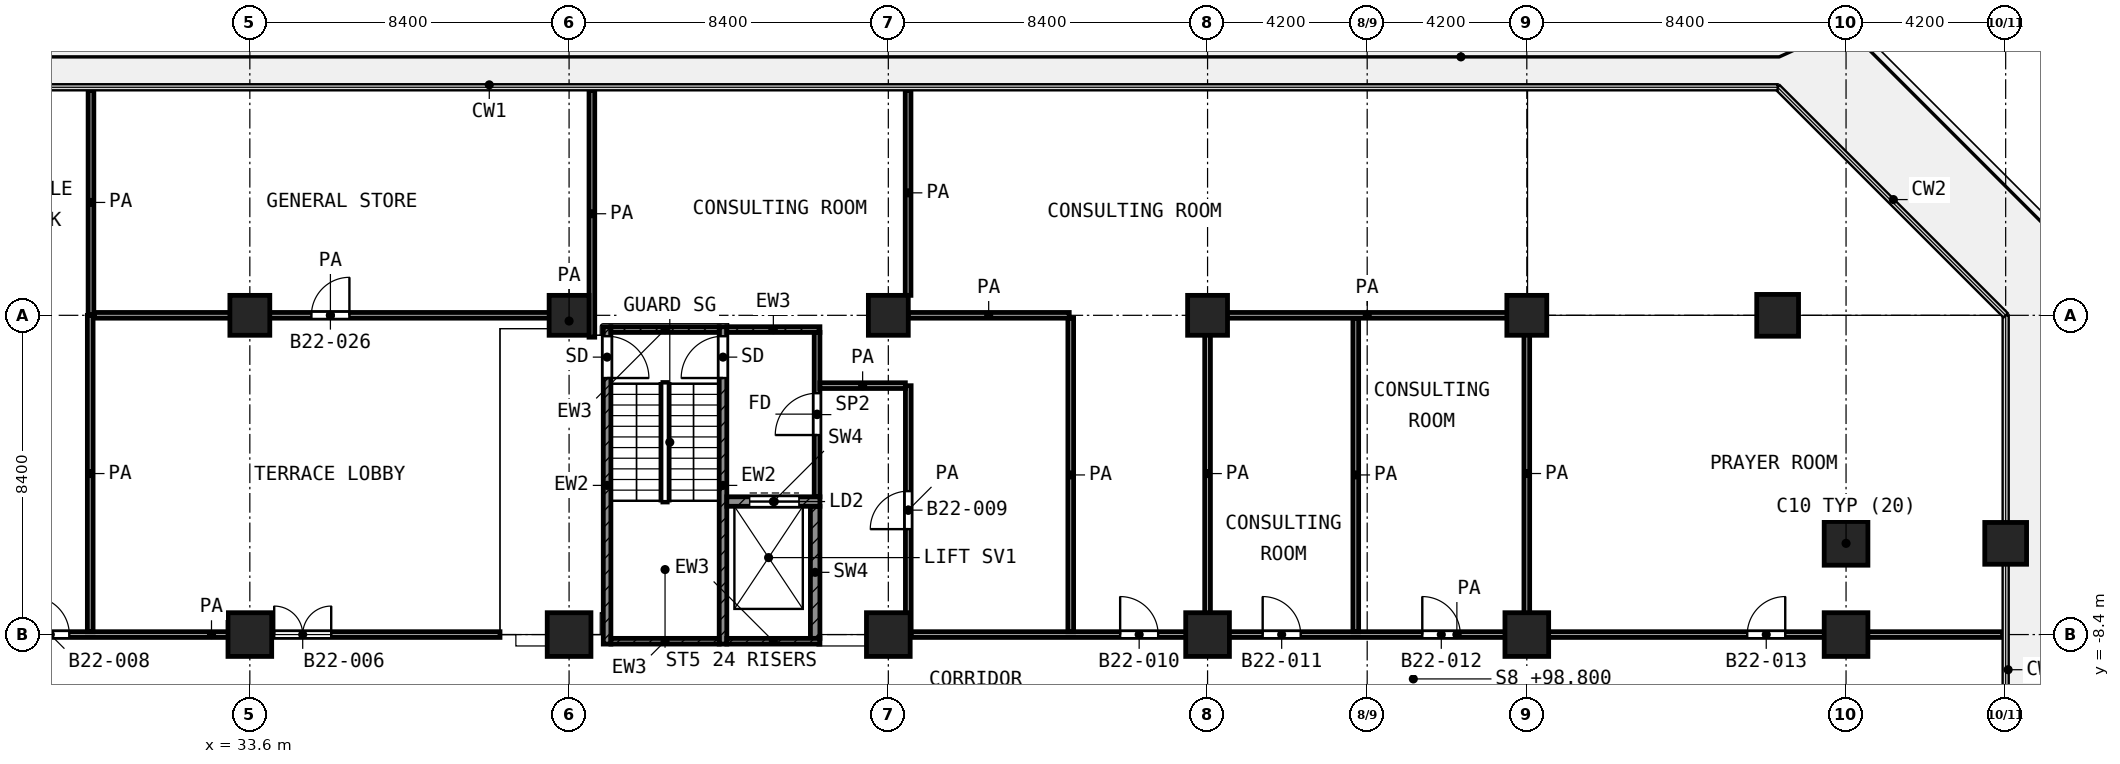
"""IFC4 building model, lengths in metres.
Left out: names, types, materials, properties, quantities, classifications, styles, units other than length and angle.
Written with IfcOpenShell. Run it as: python <this file> out.ifc"""

import sys

from ifc_helpers import new_model, si_unit, direction, frame, frame_2d, origin, origin_2d, place, context, subcontext, project, spatial, rectangle, extrude, element, fill, save


model = new_model("IFC4")
c1 = context("Model", 3, precision=1e-05, world=origin(), true_north=direction((0.0, 1.0)))
c2 = subcontext(c1, "Body", "Model", "MODEL_VIEW")
j1 = project(units=[si_unit("LENGTHUNIT", "METRE"), si_unit("PLANEANGLEUNIT", "RADIAN")], contexts=[c1])
p1 = place(None, origin())
s1 = spatial("IfcSite", under=j1, at=p1, CompositionType="ELEMENT")
p2 = place(p1, origin())
s2 = spatial("IfcBuilding", under=s1, at=p2, CompositionType="ELEMENT")
p3 = place(p2, frame((0.0, 0.0, 98.8)))
s3 = spatial("IfcBuildingStorey", under=s2, at=p3, CompositionType="ELEMENT", Elevation=98.8)
for number, where, z_axis, x_axis in (
    (1, (33.6, 0.0, 0.0), (0.0, 0.0, 1.0), (1.0, 0.0, 0.0)),
    (2, (42.0, 0.0, 0.0), (0.0, 0.0, 1.0), (1.0, 0.0, 0.0)),
    (3, (50.4, 0.0, 0.0), (0.0, 0.0, 1.0), (1.0, 0.0, 0.0)),
    (4, (58.8, 0.0, 0.0), (0.0, 0.0, 1.0), (1.0, 0.0, 0.0)),
    (5, (67.2, 0.0, 0.0), (0.0, 0.0, 1.0), (1.0, 0.0, 0.0)),
):
    element("IfcColumn", number, at=place(p3, frame(where, z_axis=z_axis, x_axis=x_axis)), inside=s3, PredefinedType="COLUMN", context=c2, shape_type="SweptSolid", body=[
        extrude(rectangle(XDim=1.05, YDim=1.05, at=origin_2d()), origin(), (0.0, 0.0, 1.0), 4.2),
    ])
p4 = place(p3, frame((73.8, 0.0, 0.0), z_axis=(0.0, 0.0, 1.0), x_axis=(1.0, 0.0, 0.0)))
e6 = element("IfcColumn", 6, at=p4, inside=s3, PredefinedType="COLUMN", context=c2, shape_type="SweptSolid", body=[
    extrude(rectangle(XDim=1.1, YDim=1.1, at=origin_2d()), origin(), (0.0, 0.0, 1.0), 4.2),
])
p5 = place(p3, frame((75.6, -6.0, 0.0), z_axis=(0.0, 0.0, 1.0), x_axis=(1.0, 0.0, 0.0)))
e7 = element("IfcColumn", 7, at=p5, inside=s3, PredefinedType="COLUMN", context=c2, shape_type="SweptSolid", body=[
    extrude(rectangle(XDim=1.15, YDim=1.15, at=origin_2d()), origin(), (0.0, 0.0, 1.0), 4.2),
])
p6 = place(p3, frame((79.8, -6.0, 0.0), z_axis=(0.0, 0.0, 1.0), x_axis=(1.0, 0.0, 0.0)))
e8 = element("IfcColumn", 8, at=p6, inside=s3, PredefinedType="COLUMN", context=c2, shape_type="SweptSolid", body=[
    extrude(rectangle(XDim=1.1, YDim=1.1, at=origin_2d()), origin(), (0.0, 0.0, 1.0), 4.2),
])
for number, where, z_axis, x_axis in (
    (9, (33.6, -8.4, 0.0), (0.0, 0.0, 1.0), (1.0, 0.0, 0.0)),
    (10, (42.0, -8.4, 0.0), (0.0, 0.0, 1.0), (1.0, 0.0, 0.0)),
    (11, (50.4, -8.4, 0.0), (0.0, 0.0, 1.0), (1.0, 0.0, 0.0)),
    (12, (58.8, -8.4, 0.0), (0.0, 0.0, 1.0), (1.0, 0.0, 0.0)),
    (13, (67.2, -8.4, 0.0), (0.0, 0.0, 1.0), (1.0, 0.0, 0.0)),
    (14, (75.6, -8.4, 0.0), (0.0, 0.0, 1.0), (1.0, 0.0, 0.0)),
):
    element("IfcColumn", number, at=place(p3, frame(where, z_axis=z_axis, x_axis=x_axis)), inside=s3, PredefinedType="COLUMN", context=c2, shape_type="SweptSolid", body=[
        extrude(rectangle(XDim=1.15, YDim=1.15, at=origin_2d()), origin(), (0.0, 0.0, 1.0), 4.2),
    ])
p7 = place(p3, frame((43.0, -8.65, 0.0), z_axis=(0.0, 0.0, 1.0), x_axis=(0.0, 1.0, 0.0)))
e15 = element("IfcWall", 15, at=p7, inside=s3, PredefinedType="SHEAR", context=c2, shape_type="SweptSolid", body=[
    extrude(rectangle(XDim=8.35, YDim=0.2, at=frame_2d((4.175, 0.0))), origin(), (0.0, 0.0, 1.0), 3.6),
])
p8 = place(p7, frame((7.0, 0.0, 0.0)))
e16 = element("IfcOpeningElement", 16, at=p8, cuts=e15, PredefinedType="OPENING", context=c2, shape_type="SweptSolid", body=[
    extrude(rectangle(XDim=1.1, YDim=2.1, at=frame_2d((0.55, 1.05))), frame((0.0, 0.11, 0.0), z_axis=(0.0, -1.0, 0.0), x_axis=(1.0, 0.0, 0.0)), (0.0, 0.0, 1.0), 0.22),
])
p9 = place(p3, frame((46.05, -8.65, 0.0), z_axis=(0.0, 0.0, 1.0), x_axis=(0.0, 1.0, 0.0)))
e17 = element("IfcWall", 17, at=p9, inside=s3, PredefinedType="SHEAR", context=c2, shape_type="SweptSolid", body=[
    extrude(rectangle(XDim=8.35, YDim=0.2, at=frame_2d((4.175, 0.0))), origin(), (0.0, 0.0, 1.0), 3.6),
])
p10 = place(p9, frame((7.0, 0.0, 0.0)))
e18 = element("IfcOpeningElement", 18, at=p10, cuts=e17, PredefinedType="OPENING", context=c2, shape_type="SweptSolid", body=[
    extrude(rectangle(XDim=1.1, YDim=2.1, at=frame_2d((0.55, 1.05))), frame((0.0, 0.11, 0.0), z_axis=(0.0, -1.0, 0.0), x_axis=(1.0, 0.0, 0.0)), (0.0, 0.0, 1.0), 0.22),
])
p11 = place(p3, frame((43.1, -0.375, 0.0), z_axis=(0.0, 0.0, 1.0), x_axis=(1.0, 0.0, 0.0)))
e19 = element("IfcWall", 19, at=p11, inside=s3, PredefinedType="SHEAR", context=c2, shape_type="SweptSolid", body=[
    extrude(rectangle(XDim=2.85, YDim=0.15, at=frame_2d((1.425, 0.0))), origin(), (0.0, 0.0, 1.0), 3.6),
])
p12 = place(p3, frame((46.15, -0.375, 0.0), z_axis=(0.0, 0.0, 1.0), x_axis=(1.0, 0.0, 0.0)))
e20 = element("IfcWall", 20, at=p12, inside=s3, PredefinedType="SHEAR", context=c2, shape_type="SweptSolid", body=[
    extrude(rectangle(XDim=2.45, YDim=0.15, at=frame_2d((1.225, 0.0))), origin(), (0.0, 0.0, 1.0), 3.6),
])
p13 = place(p3, frame((43.1, -8.575, 0.0), z_axis=(0.0, 0.0, 1.0), x_axis=(1.0, 0.0, 0.0)))
e21 = element("IfcWall", 21, at=p13, inside=s3, PredefinedType="SHEAR", context=c2, shape_type="SweptSolid", body=[
    extrude(rectangle(XDim=2.85, YDim=0.15, at=frame_2d((1.425, 0.0))), origin(), (0.0, 0.0, 1.0), 3.6),
])
p14 = place(p3, frame((46.15, -8.575, 0.0), z_axis=(0.0, 0.0, 1.0), x_axis=(1.0, 0.0, 0.0)))
e22 = element("IfcWall", 22, at=p14, inside=s3, PredefinedType="SHEAR", context=c2, shape_type="SweptSolid", body=[
    extrude(rectangle(XDim=2.45, YDim=0.15, at=frame_2d((1.225, 0.0))), origin(), (0.0, 0.0, 1.0), 3.6),
])
p15 = place(p3, frame((46.15, -4.9, 0.0), z_axis=(0.0, 0.0, 1.0), x_axis=(1.0, 0.0, 0.0)))
e23 = element("IfcWall", 23, at=p15, inside=s3, PredefinedType="SHEAR", context=c2, shape_type="SweptSolid", body=[
    extrude(rectangle(XDim=2.45, YDim=0.25, at=frame_2d((1.225, 0.0))), origin(), (0.0, 0.0, 1.0), 3.6),
])
p16 = place(p15, frame((0.6, 0.0, 0.0)))
e24 = element("IfcOpeningElement", 24, at=p16, cuts=e23, PredefinedType="OPENING", context=c2, shape_type="SweptSolid", body=[
    extrude(rectangle(XDim=1.3, YDim=2.1, at=frame_2d((0.65, 1.05))), frame((0.0, 0.135, 0.0), z_axis=(0.0, -1.0, 0.0), x_axis=(1.0, 0.0, 0.0)), (0.0, 0.0, 1.0), 0.27),
])
p17 = place(p3, frame((48.475, -8.5, 0.0), z_axis=(0.0, 0.0, 1.0), x_axis=(0.0, 1.0, 0.0)))
e25 = element("IfcWall", 25, at=p17, inside=s3, PredefinedType="SHEAR", context=c2, shape_type="SweptSolid", body=[
    extrude(rectangle(XDim=3.475, YDim=0.25, at=frame_2d((1.738, 0.0))), origin(), (0.0, 0.0, 1.0), 3.6),
])
p18 = place(p3, frame((48.525, -4.775, 0.0), z_axis=(0.0, 0.0, 1.0), x_axis=(0.0, 1.0, 0.0)))
e26 = element("IfcWall", 26, at=p18, inside=s3, PredefinedType="PARTITIONING", context=c2, shape_type="SweptSolid", body=[
    extrude(rectangle(XDim=4.325, YDim=0.15, at=frame_2d((2.163, 0.0))), origin(), (0.0, 0.0, 1.0), 3.6),
])
p19 = place(p18, frame((1.625, 0.0, 0.0)))
e27 = element("IfcOpeningElement", 27, at=p19, cuts=e26, PredefinedType="OPENING", context=c2, shape_type="SweptSolid", body=[
    extrude(rectangle(XDim=1.1, YDim=2.1, at=frame_2d((0.55, 1.05))), frame((0.0, 0.085, 0.0), z_axis=(0.0, -1.0, 0.0), x_axis=(1.0, 0.0, 0.0)), (0.0, 0.0, 1.0), 0.17),
])
p20 = place(p3, frame((25.0, -8.4, 0.0), z_axis=(0.0, 0.0, 1.0), x_axis=(1.0, 0.0, 0.0)))
e28 = element("IfcWall", 28, at=p20, inside=s3, PredefinedType="PARTITIONING", context=c2, shape_type="SweptSolid", body=[
    extrude(rectangle(XDim=15.182, YDim=0.15, at=frame_2d((7.591, 0.0))), origin(), (0.0, 0.0, 1.0), 3.6),
])
p21 = place(p20, frame((0.8, 0.0, 0.0)))
e29 = element("IfcOpeningElement", 29, at=p21, cuts=e28, PredefinedType="OPENING", context=c2, shape_type="SweptSolid", body=[
    extrude(rectangle(XDim=0.9, YDim=2.1, at=frame_2d((0.45, 1.05))), frame((0.0, 0.085, 0.0), z_axis=(0.0, -1.0, 0.0), x_axis=(1.0, 0.0, 0.0)), (0.0, 0.0, 1.0), 0.17),
])
p22 = place(p20, frame((2.85, 0.0, 0.0)))
e30 = element("IfcOpeningElement", 30, at=p22, cuts=e28, PredefinedType="OPENING", context=c2, shape_type="SweptSolid", body=[
    extrude(rectangle(XDim=1.0, YDim=2.1, at=frame_2d((0.5, 1.05))), frame((0.0, 0.085, 0.0), z_axis=(0.0, -1.0, 0.0), x_axis=(1.0, 0.0, 0.0)), (0.0, 0.0, 1.0), 0.17),
])
p23 = place(p20, frame((9.241, 0.0, 0.0)))
e31 = element("IfcOpeningElement", 31, at=p23, cuts=e28, PredefinedType="OPENING", context=c2, shape_type="SweptSolid", body=[
    extrude(rectangle(XDim=1.5, YDim=2.1, at=frame_2d((0.75, 1.05))), frame((0.0, 0.085, 0.0), z_axis=(0.0, -1.0, 0.0), x_axis=(1.0, 0.0, 0.0)), (0.0, 0.0, 1.0), 0.17),
])
p24 = place(p3, frame((51.0, -8.4, 0.0), z_axis=(0.0, 0.0, 1.0), x_axis=(1.0, 0.0, 0.0)))
e32 = element("IfcWall", 32, at=p24, inside=s3, PredefinedType="PARTITIONING", context=c2, shape_type="SweptSolid", body=[
    extrude(rectangle(XDim=28.72, YDim=0.15, at=frame_2d((14.36, 0.0))), origin(), (0.0, 0.0, 1.0), 3.6),
])
p25 = place(p24, frame((5.5, 0.0, 0.0)))
e33 = element("IfcOpeningElement", 33, at=p25, cuts=e32, PredefinedType="OPENING", context=c2, shape_type="SweptSolid", body=[
    extrude(rectangle(XDim=1.0, YDim=2.1, at=frame_2d((0.5, 1.05))), frame((0.0, 0.085, 0.0), z_axis=(0.0, -1.0, 0.0), x_axis=(1.0, 0.0, 0.0)), (0.0, 0.0, 1.0), 0.17),
])
p26 = place(p24, frame((9.25, 0.0, 0.0)))
e34 = element("IfcOpeningElement", 34, at=p26, cuts=e32, PredefinedType="OPENING", context=c2, shape_type="SweptSolid", body=[
    extrude(rectangle(XDim=1.0, YDim=2.1, at=frame_2d((0.5, 1.05))), frame((0.0, 0.085, 0.0), z_axis=(0.0, -1.0, 0.0), x_axis=(1.0, 0.0, 0.0)), (0.0, 0.0, 1.0), 0.17),
])
p27 = place(p24, frame((13.45, 0.0, 0.0)))
e35 = element("IfcOpeningElement", 35, at=p27, cuts=e32, PredefinedType="OPENING", context=c2, shape_type="SweptSolid", body=[
    extrude(rectangle(XDim=1.0, YDim=2.1, at=frame_2d((0.5, 1.05))), frame((0.0, 0.085, 0.0), z_axis=(0.0, -1.0, 0.0), x_axis=(1.0, 0.0, 0.0)), (0.0, 0.0, 1.0), 0.17),
])
p28 = place(p24, frame((22.0, 0.0, 0.0)))
e36 = element("IfcOpeningElement", 36, at=p28, cuts=e32, PredefinedType="OPENING", context=c2, shape_type="SweptSolid", body=[
    extrude(rectangle(XDim=1.0, YDim=2.1, at=frame_2d((0.5, 1.05))), frame((0.0, 0.085, 0.0), z_axis=(0.0, -1.0, 0.0), x_axis=(1.0, 0.0, 0.0)), (0.0, 0.0, 1.0), 0.17),
])
p29 = place(p3, frame((48.6, -1.85, 0.0), z_axis=(0.0, 0.0, 1.0), x_axis=(1.0, 0.0, 0.0)))
e37 = element("IfcWall", 37, at=p29, inside=s3, PredefinedType="PARTITIONING", context=c2, shape_type="SweptSolid", body=[
    extrude(rectangle(XDim=2.248, YDim=0.15, at=frame_2d((1.124, 0.0))), origin(), (0.0, 0.0, 1.0), 3.6),
])
p30 = place(p3, frame((29.515, 0.0, 0.0), z_axis=(0.0, 0.0, 1.0), x_axis=(1.0, 0.0, 0.0)))
e38 = element("IfcWall", 38, at=p30, inside=s3, PredefinedType="PARTITIONING", context=c2, shape_type="SweptSolid", body=[
    extrude(rectangle(XDim=12.41, YDim=0.15, at=frame_2d((6.205, 0.0))), origin(), (0.0, 0.0, 1.0), 3.6),
])
p31 = place(p30, frame((5.705, 0.0, 0.0)))
e39 = element("IfcOpeningElement", 39, at=p31, cuts=e38, PredefinedType="OPENING", context=c2, shape_type="SweptSolid", body=[
    extrude(rectangle(XDim=1.0, YDim=2.1, at=frame_2d((0.5, 1.05))), frame((0.0, 0.085, 0.0), z_axis=(0.0, -1.0, 0.0), x_axis=(1.0, 0.0, 0.0)), (0.0, 0.0, 1.0), 0.17),
])
p32 = place(p3, frame((50.921, 0.0, 0.0), z_axis=(0.0, 0.0, 1.0), x_axis=(1.0, 0.0, 0.0)))
e40 = element("IfcWall", 40, at=p32, inside=s3, PredefinedType="PARTITIONING", context=c2, shape_type="SweptSolid", body=[
    extrude(rectangle(XDim=4.239, YDim=0.15, at=frame_2d((2.12, 0.0))), origin(), (0.0, 0.0, 1.0), 3.6),
])
p33 = place(p3, frame((58.879, 0.0, 0.0), z_axis=(0.0, 0.0, 1.0), x_axis=(1.0, 0.0, 0.0)))
e41 = element("IfcWall", 41, at=p33, inside=s3, PredefinedType="PARTITIONING", context=c2, shape_type="SweptSolid", body=[
    extrude(rectangle(XDim=8.246, YDim=0.15, at=frame_2d((4.123, 0.0))), origin(), (0.0, 0.0, 1.0), 3.6),
])
p34 = place(p3, frame((29.4, -8.325, 0.0), z_axis=(0.0, 0.0, 1.0), x_axis=(0.0, 1.0, 0.0)))
e42 = element("IfcWall", 42, at=p34, inside=s3, PredefinedType="PARTITIONING", context=c2, shape_type="SweptSolid", body=[
    extrude(rectangle(XDim=8.323, YDim=0.15, at=frame_2d((4.162, 0.0))), origin(), (0.0, 0.0, 1.0), 3.6),
])
p35 = place(p3, frame((29.42, 0.02, 0.0), z_axis=(0.0, 0.0, 1.0), x_axis=(0.0, 1.0, 0.0)))
e43 = element("IfcWall", 43, at=p35, inside=s3, PredefinedType="PARTITIONING", context=c2, shape_type="SweptSolid", body=[
    extrude(rectangle(XDim=5.9, YDim=0.15, at=frame_2d((2.95, 0.0))), origin(), (0.0, 0.0, 1.0), 3.6),
])
p36 = place(p3, frame((42.0, -0.3, 0.0), z_axis=(0.0, 0.0, 1.0), x_axis=(0.0, 1.0, 0.0)))
e44 = element("IfcWall", 44, at=p36, inside=s3, PredefinedType="PARTITIONING", context=c2, shape_type="SweptSolid", body=[
    extrude(rectangle(XDim=0.3, YDim=0.15, at=frame_2d((0.15, 0.0))), origin(), (0.0, 0.0, 1.0), 3.6),
])
p37 = place(p3, frame((42.6, -0.575, 0.0), z_axis=(0.0, 0.0, 1.0), x_axis=(0.0, 1.0, 0.0)))
e45 = element("IfcWall", 45, at=p37, inside=s3, PredefinedType="PARTITIONING", context=c2, shape_type="SweptSolid", body=[
    extrude(rectangle(XDim=6.495, YDim=0.15, at=frame_2d((3.248, 0.0))), origin(), (0.0, 0.0, 1.0), 3.6),
])
p38 = place(p3, frame((50.92, 0.525, 0.0), z_axis=(0.0, 0.0, 1.0), x_axis=(0.0, 1.0, 0.0)))
e46 = element("IfcWall", 46, at=p38, inside=s3, PredefinedType="PARTITIONING", context=c2, shape_type="SweptSolid", body=[
    extrude(rectangle(XDim=5.395, YDim=0.15, at=frame_2d((2.698, 0.0))), origin(), (0.0, 0.0, 1.0), 3.6),
])
p39 = place(p3, frame((50.925, -8.4, 0.0), z_axis=(0.0, 0.0, 1.0), x_axis=(0.0, 1.0, 0.0)))
e47 = element("IfcWall", 47, at=p39, inside=s3, PredefinedType="PARTITIONING", context=c2, shape_type="SweptSolid", body=[
    extrude(rectangle(XDim=6.548, YDim=0.15, at=frame_2d((3.274, 0.0))), origin(), (0.0, 0.0, 1.0), 3.6),
])
p40 = place(p39, frame((2.774, 0.0, 0.0)))
e48 = element("IfcOpeningElement", 48, at=p40, cuts=e47, PredefinedType="OPENING", context=c2, shape_type="SweptSolid", body=[
    extrude(rectangle(XDim=1.0, YDim=2.1, at=frame_2d((0.5, 1.05))), frame((0.0, 0.085, 0.0), z_axis=(0.0, -1.0, 0.0), x_axis=(1.0, 0.0, 0.0)), (0.0, 0.0, 1.0), 0.17),
])
p41 = place(p3, frame((55.2, -8.325, 0.0), z_axis=(0.0, 0.0, 1.0), x_axis=(0.0, 1.0, 0.0)))
e49 = element("IfcWall", 49, at=p41, inside=s3, PredefinedType="PARTITIONING", context=c2, shape_type="SweptSolid", body=[
    extrude(rectangle(XDim=8.25, YDim=0.15, at=frame_2d((4.125, 0.0))), origin(), (0.0, 0.0, 1.0), 3.6),
])
p42 = place(p3, frame((58.8, -8.325, 0.0), z_axis=(0.0, 0.0, 1.0), x_axis=(0.0, 1.0, 0.0)))
e50 = element("IfcWall", 50, at=p42, inside=s3, PredefinedType="PARTITIONING", context=c2, shape_type="SweptSolid", body=[
    extrude(rectangle(XDim=8.322, YDim=0.15, at=frame_2d((4.161, 0.0))), origin(), (0.0, 0.0, 1.0), 3.6),
])
p43 = place(p3, frame((62.7, -8.325, 0.0), z_axis=(0.0, 0.0, 1.0), x_axis=(0.0, 1.0, 0.0)))
e51 = element("IfcWall", 51, at=p43, inside=s3, PredefinedType="PARTITIONING", context=c2, shape_type="SweptSolid", body=[
    extrude(rectangle(XDim=8.25, YDim=0.15, at=frame_2d((4.125, 0.0))), origin(), (0.0, 0.0, 1.0), 3.6),
])
p44 = place(p3, frame((67.2, -8.325, 0.0), z_axis=(0.0, 0.0, 1.0), x_axis=(0.0, 1.0, 0.0)))
e52 = element("IfcWall", 52, at=p44, inside=s3, PredefinedType="PARTITIONING", context=c2, shape_type="SweptSolid", body=[
    extrude(rectangle(XDim=8.325, YDim=0.15, at=frame_2d((4.163, 0.0))), origin(), (0.0, 0.0, 1.0), 3.6),
])
p45 = place(p8, frame((1.1, 0.0, 0.0), z_axis=(0.0, 0.0, 1.0), x_axis=(-1.0, 0.0, 0.0)))
e53 = element("IfcDoor", 53, at=p45, inside=s3, OperationType="SINGLE_SWING_LEFT", PredefinedType="DOOR", context=c2, shape_type="SweptSolid", body=[
    extrude(rectangle(XDim=1.1, YDim=2.1, at=frame_2d((0.55, 1.05))), frame((0.0, 0.025, 0.0), z_axis=(0.0, -1.0, 0.0), x_axis=(1.0, 0.0, 0.0)), (0.0, 0.0, 1.0), 0.05),
])
fill(e16, e53)
p46 = place(p10, origin())
e54 = element("IfcDoor", 54, at=p46, inside=s3, OperationType="SINGLE_SWING_LEFT", PredefinedType="DOOR", context=c2, shape_type="SweptSolid", body=[
    extrude(rectangle(XDim=1.1, YDim=2.1, at=frame_2d((0.55, 1.05))), frame((0.0, 0.025, 0.0), z_axis=(0.0, -1.0, 0.0), x_axis=(1.0, 0.0, 0.0)), (0.0, 0.0, 1.0), 0.05),
])
fill(e18, e54)
p47 = place(p16, origin())
e55 = element("IfcDoor", 55, at=p47, inside=s3, OperationType="DOUBLE_DOOR_SLIDING", PredefinedType="DOOR", context=c2, shape_type="SweptSolid", body=[
    extrude(rectangle(XDim=1.3, YDim=2.1, at=frame_2d((0.65, 1.05))), frame((0.0, 0.025, 0.0), z_axis=(0.0, -1.0, 0.0), x_axis=(1.0, 0.0, 0.0)), (0.0, 0.0, 1.0), 0.05),
])
fill(e24, e55)
p48 = place(p19, origin())
e56 = element("IfcDoor", 56, at=p48, inside=s3, OperationType="SINGLE_SWING_LEFT", PredefinedType="DOOR", context=c2, shape_type="SweptSolid", body=[
    extrude(rectangle(XDim=1.1, YDim=2.1, at=frame_2d((0.55, 1.05))), frame((0.0, 0.025, 0.0), z_axis=(0.0, -1.0, 0.0), x_axis=(1.0, 0.0, 0.0)), (0.0, 0.0, 1.0), 0.05),
])
fill(e27, e56)
p49 = place(p40, origin())
e57 = element("IfcDoor", 57, at=p49, inside=s3, OperationType="SINGLE_SWING_LEFT", PredefinedType="DOOR", context=c2, shape_type="SweptSolid", body=[
    extrude(rectangle(XDim=1.0, YDim=2.1, at=frame_2d((0.5, 1.05))), frame((0.0, 0.025, 0.0), z_axis=(0.0, -1.0, 0.0), x_axis=(1.0, 0.0, 0.0)), (0.0, 0.0, 1.0), 0.05),
])
fill(e48, e57)
p50 = place(p25, origin())
e58 = element("IfcDoor", 58, at=p50, inside=s3, OperationType="SINGLE_SWING_LEFT", PredefinedType="DOOR", context=c2, shape_type="SweptSolid", body=[
    extrude(rectangle(XDim=1.0, YDim=2.1, at=frame_2d((0.5, 1.05))), frame((0.0, 0.025, 0.0), z_axis=(0.0, -1.0, 0.0), x_axis=(1.0, 0.0, 0.0)), (0.0, 0.0, 1.0), 0.05),
])
fill(e33, e58)
p51 = place(p26, origin())
e59 = element("IfcDoor", 59, at=p51, inside=s3, OperationType="SINGLE_SWING_LEFT", PredefinedType="DOOR", context=c2, shape_type="SweptSolid", body=[
    extrude(rectangle(XDim=1.0, YDim=2.1, at=frame_2d((0.5, 1.05))), frame((0.0, 0.025, 0.0), z_axis=(0.0, -1.0, 0.0), x_axis=(1.0, 0.0, 0.0)), (0.0, 0.0, 1.0), 0.05),
])
fill(e34, e59)
p52 = place(p27, origin())
e60 = element("IfcDoor", 60, at=p52, inside=s3, OperationType="SINGLE_SWING_LEFT", PredefinedType="DOOR", context=c2, shape_type="SweptSolid", body=[
    extrude(rectangle(XDim=1.0, YDim=2.1, at=frame_2d((0.5, 1.05))), frame((0.0, 0.025, 0.0), z_axis=(0.0, -1.0, 0.0), x_axis=(1.0, 0.0, 0.0)), (0.0, 0.0, 1.0), 0.05),
])
fill(e35, e60)
p53 = place(p28, origin())
e61 = element("IfcDoor", 61, at=p53, inside=s3, OperationType="SINGLE_SWING_RIGHT", PredefinedType="DOOR", context=c2, shape_type="SweptSolid", body=[
    extrude(rectangle(XDim=1.0, YDim=2.1, at=frame_2d((0.5, 1.05))), frame((0.0, 0.025, 0.0), z_axis=(0.0, -1.0, 0.0), x_axis=(1.0, 0.0, 0.0)), (0.0, 0.0, 1.0), 0.05),
])
fill(e36, e61)
p54 = place(p22, origin())
e62 = element("IfcDoor", 62, at=p54, inside=s3, OperationType="SINGLE_SWING_LEFT", PredefinedType="DOOR", context=c2, shape_type="SweptSolid", body=[
    extrude(rectangle(XDim=1.0, YDim=2.1, at=frame_2d((0.5, 1.05))), frame((0.0, 0.025, 0.0), z_axis=(0.0, -1.0, 0.0), x_axis=(1.0, 0.0, 0.0)), (0.0, 0.0, 1.0), 0.05),
])
fill(e30, e62)
p55 = place(p23, origin())
e63 = element("IfcDoor", 63, at=p55, inside=s3, OperationType="DOUBLE_DOOR_SINGLE_SWING", PredefinedType="DOOR", context=c2, shape_type="SweptSolid", body=[
    extrude(rectangle(XDim=1.5, YDim=2.1, at=frame_2d((0.75, 1.05))), frame((0.0, 0.025, 0.0), z_axis=(0.0, -1.0, 0.0), x_axis=(1.0, 0.0, 0.0)), (0.0, 0.0, 1.0), 0.05),
])
fill(e31, e63)
p56 = place(p31, origin())
e64 = element("IfcDoor", 64, at=p56, inside=s3, OperationType="SINGLE_SWING_RIGHT", PredefinedType="DOOR", context=c2, shape_type="SweptSolid", body=[
    extrude(rectangle(XDim=1.0, YDim=2.1, at=frame_2d((0.5, 1.05))), frame((0.0, 0.025, 0.0), z_axis=(0.0, -1.0, 0.0), x_axis=(1.0, 0.0, 0.0)), (0.0, 0.0, 1.0), 0.05),
])
fill(e39, e64)
save(model, sys.argv[1])
